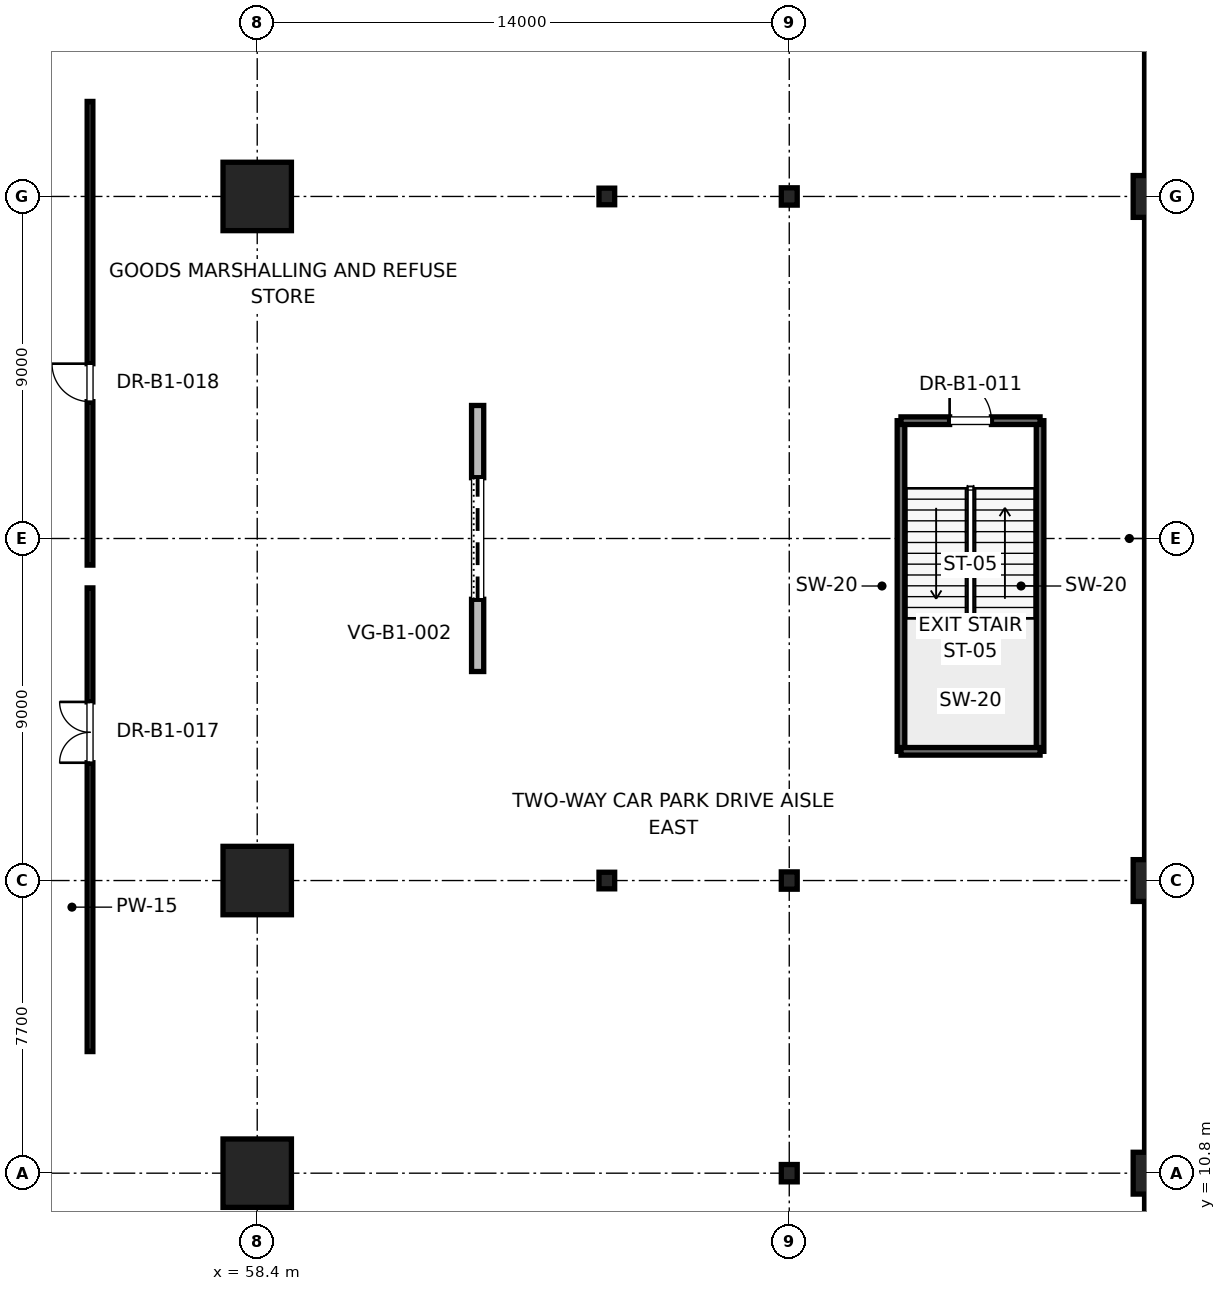
"""IFC4 building model, lengths in metres.
Left out: names, types, materials, properties, quantities, classifications, styles, units other than length and angle.
Written with IfcOpenShell. Run it as: python <this file> out.ifc"""

import sys

from ifc_helpers import new_model, si_unit, direction, frame, frame_2d, origin, origin_2d, place, context, subcontext, project, spatial, rectangle, i_section, extrude, element, fill, save


model = new_model("IFC4")
c1 = context("Model", 3, precision=1e-05, world=origin(), true_north=direction((0.0, 1.0)))
c2 = subcontext(c1, "Body", "Model", "MODEL_VIEW")
j1 = project(units=[si_unit("LENGTHUNIT", "METRE"), si_unit("PLANEANGLEUNIT", "RADIAN")], contexts=[c1])
p1 = place(None, origin())
s1 = spatial("IfcSite", under=j1, at=p1, CompositionType="ELEMENT")
p2 = place(p1, origin())
s2 = spatial("IfcBuilding", under=s1, at=p2, CompositionType="ELEMENT")
p3 = place(p2, frame((0.0, 0.0, -4.5)))
s3 = spatial("IfcBuildingStorey", under=s2, at=p3, CompositionType="ELEMENT", Elevation=-4.5)
for number, where, z_axis, x_axis in (
    (1, (58.4, 18.5, 0.0), (0.0, 0.0, 1.0), (1.0, 0.0, 0.0)),
    (2, (58.4, 36.5, 0.0), (0.0, 0.0, 1.0), (1.0, 0.0, 0.0)),
    (3, (58.4, 10.8, 0.0), (0.0, 0.0, 1.0), (1.0, 0.0, 0.0)),
):
    element("IfcColumn", number, at=place(p3, frame(where, z_axis=z_axis, x_axis=x_axis)), inside=s3, PredefinedType="COLUMN", context=c2, shape_type="SweptSolid", body=[
        extrude(rectangle(XDim=1.8, YDim=1.8, at=origin_2d()), origin(), (0.0, 0.0, 1.0), 4.5),
    ])
for number, where, z_axis, x_axis in (
    (4, (67.6, 18.5, 0.0), (0.0, 0.0, 1.0), (1.0, 0.0, 0.0)),
    (5, (67.6, 36.5, 0.0), (0.0, 0.0, 1.0), (1.0, 0.0, 0.0)),
):
    element("IfcColumn", number, at=place(p3, frame(where, z_axis=z_axis, x_axis=x_axis)), inside=s3, PredefinedType="COLUMN", context=c2, shape_type="SweptSolid", body=[
        extrude(i_section(OverallWidth=0.412, OverallDepth=0.437, WebThickness=0.036, FlangeThickness=0.058, FilletRadius=0.015, at=origin_2d()), origin(), (0.0, 0.0, 1.0), 4.5),
    ])
for number, where, z_axis, x_axis in (
    (6, (82.0, 10.8, 0.0), (0.0, 0.0, 1.0), (1.0, 0.0, 0.0)),
    (7, (82.0, 18.5, 0.0), (0.0, 0.0, 1.0), (1.0, 0.0, 0.0)),
    (8, (82.0, 36.5, 0.0), (0.0, 0.0, 1.0), (1.0, 0.0, 0.0)),
):
    element("IfcColumn", number, at=place(p3, frame(where, z_axis=z_axis, x_axis=x_axis)), inside=s3, PredefinedType="COLUMN", context=c2, shape_type="SweptSolid", body=[
        extrude(rectangle(XDim=1.1, YDim=1.1, at=origin_2d()), origin(), (0.0, 0.0, 1.0), 4.5),
    ])
for number, where, z_axis, x_axis in (
    (9, (72.4, 10.8, 0.0), (0.0, 0.0, 1.0), (1.0, 0.0, 0.0)),
    (10, (72.4, 18.5, 0.0), (0.0, 0.0, 1.0), (1.0, 0.0, 0.0)),
    (11, (72.4, 36.5, 0.0), (0.0, 0.0, 1.0), (1.0, 0.0, 0.0)),
):
    element("IfcColumn", number, at=place(p3, frame(where, z_axis=z_axis, x_axis=x_axis)), inside=s3, PredefinedType="COLUMN", context=c2, shape_type="SweptSolid", body=[
        extrude(i_section(OverallWidth=0.418, OverallDepth=0.456, WebThickness=0.042, FlangeThickness=0.067, FilletRadius=0.015, at=origin_2d()), origin(), (0.0, 0.0, 1.0), 4.5),
    ])
p4 = place(p3, frame((82.0, -1.5, 0.0), z_axis=(0.0, 0.0, 1.0), x_axis=(0.0, 1.0, 0.0)))
e12 = element("IfcWall", 12, at=p4, inside=s3, PredefinedType="USERDEFINED", context=c2, shape_type="SweptSolid", body=[
    extrude(rectangle(XDim=58.0, YDim=0.5, at=frame_2d((29.0, 0.0))), origin(), (0.0, 0.0, 1.0), 3.4),
])
p5 = place(p3, frame((64.2, 24.0, 0.0), z_axis=(0.0, 0.0, 1.0), x_axis=(0.0, 1.0, 0.0)))
e13 = element("IfcWall", 13, at=p5, inside=s3, PredefinedType="SOLIDWALL", context=c2, shape_type="SweptSolid", body=[
    extrude(rectangle(XDim=7.0, YDim=0.32, at=frame_2d((3.5, 0.0))), origin(), (0.0, 0.0, 1.0), 4.22),
])
p6 = place(p5, frame((1.9, 0.0, 0.0)))
e14 = element("IfcOpeningElement", 14, at=p6, cuts=e13, PredefinedType="OPENING", context=c2, shape_type="SweptSolid", body=[
    extrude(rectangle(XDim=3.2, YDim=2.8, at=frame_2d((1.6, 1.4))), frame((0.0, 0.16, 0.0), z_axis=(0.0, -1.0, 0.0), x_axis=(1.0, 0.0, 0.0)), (0.0, 0.0, 1.0), 0.32),
])
for number, where, z_axis, x_axis in (
    (15, (75.34, 21.9, 0.0), (0.0, 0.0, 1.0), (0.0, 1.0, 0.0)),
    (16, (79.0, 21.9, 0.0), (0.0, 0.0, 1.0), (0.0, 1.0, 0.0)),
):
    element("IfcWall", number, at=place(p3, frame(where, z_axis=z_axis, x_axis=x_axis)), inside=s3, PredefinedType="SOLIDWALL", context=c2, shape_type="SweptSolid", body=[
        extrude(rectangle(XDim=8.7, YDim=0.2, at=frame_2d((4.35, 0.0))), origin(), (0.0, 0.0, 1.0), 4.22),
    ])
p7 = place(p3, frame((75.34, 30.6, 0.0), z_axis=(0.0, 0.0, 1.0), x_axis=(1.0, 0.0, 0.0)))
e17 = element("IfcWall", 17, at=p7, inside=s3, PredefinedType="SOLIDWALL", context=c2, shape_type="SweptSolid", body=[
    extrude(rectangle(XDim=3.66, YDim=0.2, at=frame_2d((1.83, 0.0))), origin(), (0.0, 0.0, 1.0), 4.22),
])
p8 = place(p7, frame((1.28, 0.0, 0.0)))
e18 = element("IfcOpeningElement", 18, at=p8, cuts=e17, PredefinedType="OPENING", context=c2, shape_type="SweptSolid", body=[
    extrude(rectangle(XDim=1.1, YDim=2.15, at=frame_2d((0.55, 1.075))), frame((0.0, 0.1, 0.0), z_axis=(0.0, -1.0, 0.0), x_axis=(1.0, 0.0, 0.0)), (0.0, 0.0, 1.0), 0.2),
])
p9 = place(p3, frame((75.34, 21.9, 0.0), z_axis=(0.0, 0.0, 1.0), x_axis=(1.0, 0.0, 0.0)))
e19 = element("IfcWall", 19, at=p9, inside=s3, PredefinedType="SOLIDWALL", context=c2, shape_type="SweptSolid", body=[
    extrude(rectangle(XDim=3.66, YDim=0.2, at=frame_2d((1.83, 0.0))), origin(), (0.0, 0.0, 1.0), 4.22),
])
p10 = place(p3, frame((54.0, 14.0, 0.0), z_axis=(0.0, 0.0, 1.0), x_axis=(0.0, 1.0, 0.0)))
e20 = element("IfcWall", 20, at=p10, inside=s3, PredefinedType="PARTITIONING", context=c2, shape_type="SweptSolid", body=[
    extrude(rectangle(XDim=12.2, YDim=0.15, at=frame_2d((6.1, 0.0))), origin(), (0.0, 0.0, 1.0), 2.85),
])
p11 = place(p10, frame((7.6, 0.0, 0.0)))
e21 = element("IfcOpeningElement", 21, at=p11, cuts=e20, PredefinedType="OPENING", context=c2, shape_type="SweptSolid", body=[
    extrude(rectangle(XDim=1.6, YDim=2.25, at=frame_2d((0.8, 1.125))), frame((0.0, 0.075, 0.0), z_axis=(0.0, -1.0, 0.0), x_axis=(1.0, 0.0, 0.0)), (0.0, 0.0, 1.0), 0.15),
])
p12 = place(p3, frame((54.0, 26.8, 0.0), z_axis=(0.0, 0.0, 1.0), x_axis=(0.0, 1.0, 0.0)))
e22 = element("IfcWall", 22, at=p12, inside=s3, PredefinedType="PARTITIONING", context=c2, shape_type="SweptSolid", body=[
    extrude(rectangle(XDim=12.2, YDim=0.15, at=frame_2d((6.1, 0.0))), origin(), (0.0, 0.0, 1.0), 2.85),
])
p13 = place(p12, frame((4.3, 0.0, 0.0)))
e23 = element("IfcOpeningElement", 23, at=p13, cuts=e22, PredefinedType="OPENING", context=c2, shape_type="SweptSolid", body=[
    extrude(rectangle(XDim=1.0, YDim=2.15, at=frame_2d((0.5, 1.075))), frame((0.0, 0.075, 0.0), z_axis=(0.0, -1.0, 0.0), x_axis=(1.0, 0.0, 0.0)), (0.0, 0.0, 1.0), 0.15),
])
p14 = place(p6, origin())
e24 = element("IfcDoor", 24, at=p14, inside=s3, OperationType="ROLLINGUP", PredefinedType="GATE", context=c2, shape_type="SweptSolid", body=[
    extrude(rectangle(XDim=3.2, YDim=2.8, at=frame_2d((1.6, 1.4))), frame((0.0, 0.025, 0.0), z_axis=(0.0, -1.0, 0.0), x_axis=(1.0, 0.0, 0.0)), (0.0, 0.0, 1.0), 0.05),
])
fill(e14, e24)
p15 = place(p8, origin())
e25 = element("IfcDoor", 25, at=p15, inside=s3, OperationType="SINGLE_SWING_LEFT", PredefinedType="DOOR", context=c2, shape_type="SweptSolid", body=[
    extrude(rectangle(XDim=1.1, YDim=2.15, at=frame_2d((0.55, 1.075))), frame((0.0, 0.025, 0.0), z_axis=(0.0, -1.0, 0.0), x_axis=(1.0, 0.0, 0.0)), (0.0, 0.0, 1.0), 0.05),
])
fill(e18, e25)
p16 = place(p11, origin())
e26 = element("IfcDoor", 26, at=p16, inside=s3, OperationType="DOUBLE_DOOR_SINGLE_SWING", PredefinedType="DOOR", context=c2, shape_type="SweptSolid", body=[
    extrude(rectangle(XDim=1.6, YDim=2.25, at=frame_2d((0.8, 1.125))), frame((0.0, 0.025, 0.0), z_axis=(0.0, -1.0, 0.0), x_axis=(1.0, 0.0, 0.0)), (0.0, 0.0, 1.0), 0.05),
])
fill(e21, e26)
p17 = place(p13, origin())
e27 = element("IfcDoor", 27, at=p17, inside=s3, OperationType="SINGLE_SWING_RIGHT", PredefinedType="DOOR", context=c2, shape_type="SweptSolid", body=[
    extrude(rectangle(XDim=1.0, YDim=2.15, at=frame_2d((0.5, 1.075))), frame((0.0, 0.025, 0.0), z_axis=(0.0, -1.0, 0.0), x_axis=(1.0, 0.0, 0.0)), (0.0, 0.0, 1.0), 0.05),
])
fill(e23, e27)
save(model, sys.argv[1])
